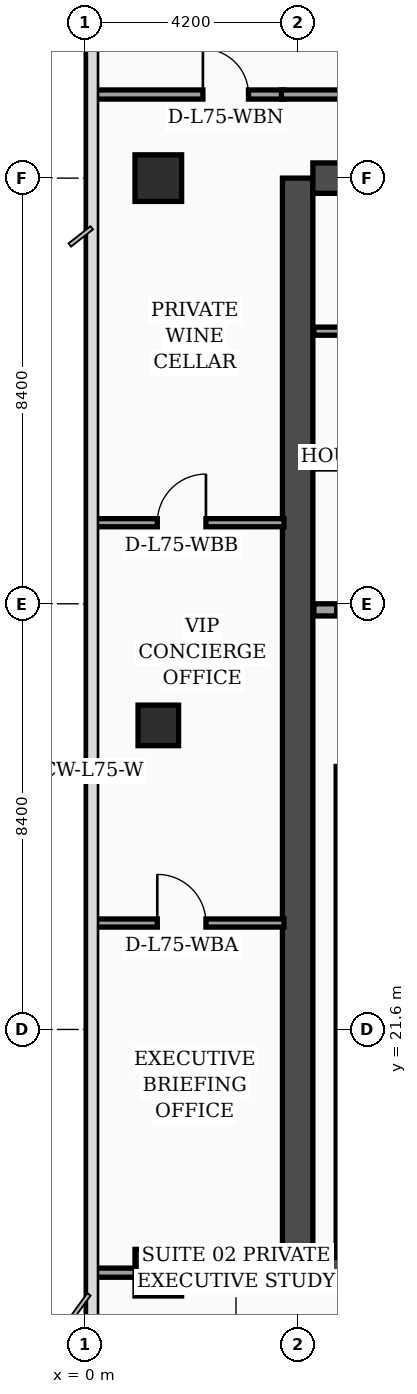
"""IFC4 building model, lengths in metres.
Left out: names, types, materials, properties, quantities, classifications, styles, units other than length and angle.
Written with IfcOpenShell. Run it as: python <this file> out.ifc"""

import sys

from ifc_helpers import new_model, si_unit, direction, frame, frame_2d, origin, origin_2d, place, context, subcontext, project, spatial, rectangle, extrude, element, fill, save


model = new_model("IFC4")
c1 = context("Model", 3, precision=1e-05, world=origin(), true_north=direction((0.0, 1.0)))
c2 = subcontext(c1, "Body", "Model", "MODEL_VIEW")
j1 = project(units=[si_unit("LENGTHUNIT", "METRE"), si_unit("PLANEANGLEUNIT", "RADIAN")], contexts=[c1])
p1 = place(None, origin())
s1 = spatial("IfcSite", under=j1, at=p1, CompositionType="ELEMENT")
p2 = place(p1, origin())
s2 = spatial("IfcBuilding", under=s1, at=p2, CompositionType="ELEMENT")
p3 = place(p2, frame((0.0, 0.0, 302.5)))
s3 = spatial("IfcBuildingStorey", under=s2, at=p3, CompositionType="ELEMENT", Elevation=302.5)
p4 = place(p3, frame((4.2, 16.8, 0.0), z_axis=(0.0, 0.0, 1.0), x_axis=(0.0, 1.0, 0.0)))
e1 = element("IfcWall", 1, at=p4, inside=s3, PredefinedType="SHEAR", context=c2, shape_type="SweptSolid", body=[
    extrude(rectangle(XDim=21.6, YDim=0.6, at=frame_2d((10.8, 0.0))), origin(), (0.0, 0.0, 1.0), 4.05),
])
p5 = place(p3, frame((4.5, 38.4, 0.0), z_axis=(0.0, 0.0, 1.0), x_axis=(1.0, 0.0, 0.0)))
e2 = element("IfcWall", 2, at=p5, inside=s3, PredefinedType="SHEAR", context=c2, shape_type="SweptSolid", body=[
    extrude(rectangle(XDim=10.2, YDim=0.6, at=frame_2d((5.1, 0.0))), origin(), (0.0, 0.0, 1.0), 4.05),
])
p6 = place(p5, frame((5.8, 0.0, 0.0)))
e3 = element("IfcOpeningElement", 3, at=p6, cuts=e2, PredefinedType="OPENING", context=c2, shape_type="SweptSolid", body=[
    extrude(rectangle(XDim=1.1, YDim=2.2, at=frame_2d((0.55, 1.1))), frame((0.0, 0.31, 0.0), z_axis=(0.0, -1.0, 0.0), x_axis=(1.0, 0.0, 0.0)), (0.0, 0.0, 1.0), 0.62),
])
p7 = place(p3, frame((4.5, 16.8, 0.0), z_axis=(0.0, 0.0, 1.0), x_axis=(1.0, 0.0, 0.0)))
e4 = element("IfcWall", 4, at=p7, inside=s3, PredefinedType="SHEAR", context=c2, shape_type="SweptSolid", body=[
    extrude(rectangle(XDim=10.2, YDim=0.6, at=frame_2d((5.1, 0.0))), origin(), (0.0, 0.0, 1.0), 4.05),
])
p8 = place(p3, frame((5.08, 17.1, 0.0), z_axis=(0.0, 0.0, 1.0), x_axis=(0.0, 1.0, 0.0)))
e5 = element("IfcWall", 5, at=p8, inside=s3, PredefinedType="SOLIDWALL", context=c2, shape_type="SweptSolid", body=[
    extrude(rectangle(XDim=9.69, YDim=0.24, at=frame_2d((4.845, 0.0))), origin(), (0.0, 0.0, 1.0), 4.05),
])
p9 = place(p3, frame((1.45, 16.8, 0.0), z_axis=(0.0, 0.0, 1.0), x_axis=(1.0, 0.0, 0.0)))
e6 = element("IfcColumn", 6, at=p9, inside=s3, PredefinedType="COLUMN", context=c2, shape_type="SweptSolid", body=[
    extrude(rectangle(XDim=0.92, YDim=0.92, at=origin_2d()), origin(), (0.0, 0.0, 1.0), 4.05),
])
p10 = place(p3, frame((1.45, 27.6, 0.0), z_axis=(0.0, 0.0, 1.0), x_axis=(1.0, 0.0, 0.0)))
e7 = element("IfcColumn", 7, at=p10, inside=s3, PredefinedType="COLUMN", context=c2, shape_type="SweptSolid", body=[
    extrude(rectangle(XDim=0.8, YDim=0.8, at=origin_2d()), origin(), (0.0, 0.0, 1.0), 4.05),
])
p11 = place(p3, frame((1.45, 38.4, 0.0), z_axis=(0.0, 0.0, 1.0), x_axis=(1.0, 0.0, 0.0)))
e8 = element("IfcColumn", 8, at=p11, inside=s3, PredefinedType="COLUMN", context=c2, shape_type="SweptSolid", body=[
    extrude(rectangle(XDim=0.92, YDim=0.92, at=origin_2d()), origin(), (0.0, 0.0, 1.0), 4.05),
])
p12 = place(p3, frame((4.52, 29.88, 0.0), z_axis=(0.0, 0.0, 1.0), x_axis=(1.0, 0.0, 0.0)))
e9 = element("IfcWall", 9, at=p12, inside=s3, PredefinedType="SOLIDWALL", context=c2, shape_type="SweptSolid", body=[
    extrude(rectangle(XDim=4.9, YDim=0.24, at=frame_2d((2.45, 0.0))), origin(), (0.0, 0.0, 1.0), 4.05),
])
p13 = place(p12, frame((0.45, 0.0, 0.0)))
e10 = element("IfcOpeningElement", 10, at=p13, cuts=e9, PredefinedType="OPENING", context=c2, shape_type="SweptSolid", body=[
    extrude(rectangle(XDim=1.3, YDim=2.35, at=frame_2d((0.65, 1.175))), frame((0.0, 0.13, 0.0), z_axis=(0.0, -1.0, 0.0), x_axis=(1.0, 0.0, 0.0)), (0.0, 0.0, 1.0), 0.26),
])
p14 = place(p3, frame((4.52, 32.78, 0.0), z_axis=(0.0, 0.0, 1.0), x_axis=(1.0, 0.0, 0.0)))
e11 = element("IfcWall", 11, at=p14, inside=s3, PredefinedType="SOLIDWALL", context=c2, shape_type="SweptSolid", body=[
    extrude(rectangle(XDim=4.9, YDim=0.24, at=frame_2d((2.45, 0.0))), origin(), (0.0, 0.0, 1.0), 3.7),
])
p15 = place(p3, frame((4.52, 35.38, 0.0), z_axis=(0.0, 0.0, 1.0), x_axis=(1.0, 0.0, 0.0)))
e12 = element("IfcWall", 12, at=p15, inside=s3, PredefinedType="PARTITIONING", context=c2, shape_type="SweptSolid", body=[
    extrude(rectangle(XDim=4.9, YDim=0.16, at=frame_2d((2.45, 0.0))), origin(), (0.0, 0.0, 1.0), 4.05),
])
p16 = place(p15, frame((1.3, 0.0, 0.0)))
e13 = element("IfcOpeningElement", 13, at=p16, cuts=e12, PredefinedType="OPENING", context=c2, shape_type="SweptSolid", body=[
    extrude(rectangle(XDim=0.98, YDim=2.15, at=frame_2d((0.49, 1.075))), frame((0.0, 0.09, 0.0), z_axis=(0.0, -1.0, 0.0), x_axis=(1.0, 0.0, 0.0)), (0.0, 0.0, 1.0), 0.18),
])
p17 = place(p3, frame((0.08, 23.7, 0.0), z_axis=(0.0, 0.0, 1.0), x_axis=(1.0, 0.0, 0.0)))
e14 = element("IfcWall", 14, at=p17, inside=s3, PredefinedType="PARTITIONING", context=c2, shape_type="SweptSolid", body=[
    extrude(rectangle(XDim=3.85, YDim=0.16, at=frame_2d((1.925, 0.0))), origin(), (0.0, 0.0, 1.0), 3.6),
])
p18 = place(p17, frame((1.35, 0.0, 0.0)))
e15 = element("IfcOpeningElement", 15, at=p18, cuts=e14, PredefinedType="OPENING", context=c2, shape_type="SweptSolid", body=[
    extrude(rectangle(XDim=0.96, YDim=2.2, at=frame_2d((0.48, 1.1))), frame((0.0, 0.09, 0.0), z_axis=(0.0, -1.0, 0.0), x_axis=(1.0, 0.0, 0.0)), (0.0, 0.0, 1.0), 0.18),
])
p19 = place(p3, frame((0.08, 31.6, 0.0), z_axis=(0.0, 0.0, 1.0), x_axis=(1.0, 0.0, 0.0)))
e16 = element("IfcWall", 16, at=p19, inside=s3, PredefinedType="PARTITIONING", context=c2, shape_type="SweptSolid", body=[
    extrude(rectangle(XDim=3.85, YDim=0.16, at=frame_2d((1.925, 0.0))), origin(), (0.0, 0.0, 1.0), 3.6),
])
p20 = place(p19, frame((1.35, 0.0, 0.0)))
e17 = element("IfcOpeningElement", 17, at=p20, cuts=e16, PredefinedType="OPENING", context=c2, shape_type="SweptSolid", body=[
    extrude(rectangle(XDim=0.96, YDim=2.2, at=frame_2d((0.48, 1.1))), frame((0.0, 0.09, 0.0), z_axis=(0.0, -1.0, 0.0), x_axis=(1.0, 0.0, 0.0)), (0.0, 0.0, 1.0), 0.18),
])
p21 = place(p3, frame((0.08, 16.8, 0.0), z_axis=(0.0, 0.0, 1.0), x_axis=(1.0, 0.0, 0.0)))
e18 = element("IfcWall", 18, at=p21, inside=s3, PredefinedType="PARTITIONING", context=c2, shape_type="SweptSolid", body=[
    extrude(rectangle(XDim=3.85, YDim=0.18, at=frame_2d((1.925, 0.0))), origin(), (0.0, 0.0, 1.0), 3.5),
])
p22 = place(p3, frame((0.08, 40.05, 0.0), z_axis=(0.0, 0.0, 1.0), x_axis=(1.0, 0.0, 0.0)))
e19 = element("IfcWall", 19, at=p22, inside=s3, PredefinedType="PARTITIONING", context=c2, shape_type="SweptSolid", body=[
    extrude(rectangle(XDim=3.85, YDim=0.18, at=frame_2d((1.925, 0.0))), origin(), (0.0, 0.0, 1.0), 3.5),
])
p23 = place(p22, frame((2.25, 0.0, 0.0)))
e20 = element("IfcOpeningElement", 20, at=p23, cuts=e19, PredefinedType="OPENING", context=c2, shape_type="SweptSolid", body=[
    extrude(rectangle(XDim=0.9, YDim=2.15, at=frame_2d((0.45, 1.075))), frame((0.0, 0.1, 0.0), z_axis=(0.0, -1.0, 0.0), x_axis=(1.0, 0.0, 0.0)), (0.0, 0.0, 1.0), 0.2),
])
p24 = place(p3, frame((3.88, 40.05, 0.0), z_axis=(0.0, 0.0, 1.0), x_axis=(1.0, 0.0, 0.0)))
e21 = element("IfcWall", 21, at=p24, inside=s3, PredefinedType="PARTITIONING", context=c2, shape_type="SweptSolid", body=[
    extrude(rectangle(XDim=11.27, YDim=0.18, at=frame_2d((5.635, 0.0))), origin(), (0.0, 0.0, 1.0), 3.5),
])
p25 = place(p13, origin())
e22 = element("IfcDoor", 22, at=p25, inside=s3, OperationType="DOUBLE_DOOR_SLIDING", PredefinedType="DOOR", context=c2, shape_type="SweptSolid", body=[
    extrude(rectangle(XDim=1.3, YDim=2.35, at=frame_2d((0.65, 1.175))), frame((0.0, 0.025, 0.0), z_axis=(0.0, -1.0, 0.0), x_axis=(1.0, 0.0, 0.0)), (0.0, 0.0, 1.0), 0.05),
])
fill(e10, e22)
p26 = place(p18, origin())
e23 = element("IfcDoor", 23, at=p26, inside=s3, OperationType="SINGLE_SWING_LEFT", PredefinedType="DOOR", context=c2, shape_type="SweptSolid", body=[
    extrude(rectangle(XDim=0.96, YDim=2.2, at=frame_2d((0.48, 1.1))), frame((0.0, 0.025, 0.0), z_axis=(0.0, -1.0, 0.0), x_axis=(1.0, 0.0, 0.0)), (0.0, 0.0, 1.0), 0.05),
])
fill(e15, e23)
p27 = place(p20, origin())
e24 = element("IfcDoor", 24, at=p27, inside=s3, OperationType="SINGLE_SWING_RIGHT", PredefinedType="DOOR", context=c2, shape_type="SweptSolid", body=[
    extrude(rectangle(XDim=0.96, YDim=2.2, at=frame_2d((0.48, 1.1))), frame((0.0, 0.025, 0.0), z_axis=(0.0, -1.0, 0.0), x_axis=(1.0, 0.0, 0.0)), (0.0, 0.0, 1.0), 0.05),
])
fill(e17, e24)
p28 = place(p23, origin())
e25 = element("IfcDoor", 25, at=p28, inside=s3, OperationType="SINGLE_SWING_LEFT", PredefinedType="DOOR", context=c2, shape_type="SweptSolid", body=[
    extrude(rectangle(XDim=0.9, YDim=2.15, at=frame_2d((0.45, 1.075))), frame((0.0, 0.025, 0.0), z_axis=(0.0, -1.0, 0.0), x_axis=(1.0, 0.0, 0.0)), (0.0, 0.0, 1.0), 0.05),
])
fill(e20, e25)
save(model, sys.argv[1])
